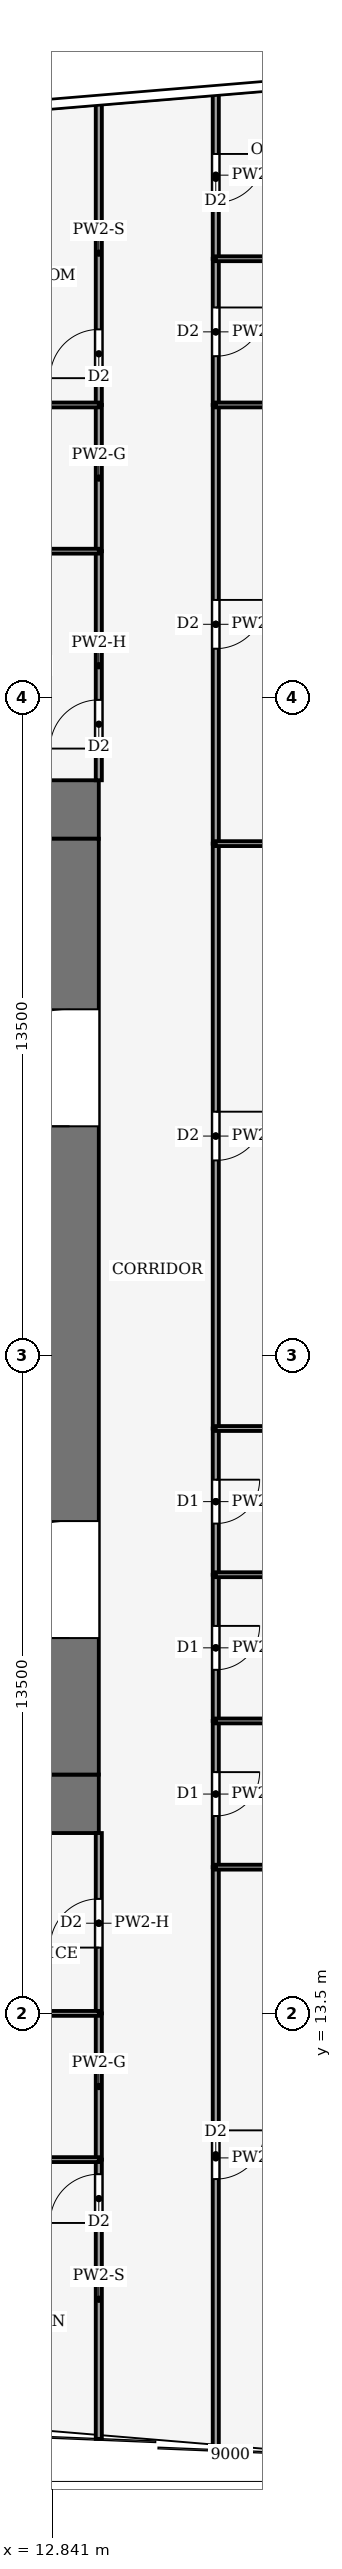
"""IFC4 building model, lengths in metres.
Left out: names, types, materials, properties, quantities, classifications, styles, units other than length and angle.
Written with IfcOpenShell. Run it as: python <this file> out.ifc"""

import sys

from ifc_helpers import new_model, si_unit, direction, frame, frame_2d, origin, place, context, subcontext, project, spatial, rectangle, extrude, element, fill, save


model = new_model("IFC4")
c1 = context("Model", 3, precision=1e-05, world=origin(), true_north=direction((0.0, 1.0)))
c2 = subcontext(c1, "Body", "Model", "MODEL_VIEW")
j1 = project(units=[si_unit("LENGTHUNIT", "METRE"), si_unit("PLANEANGLEUNIT", "RADIAN")], contexts=[c1])
p1 = place(None, origin())
s1 = spatial("IfcSite", under=j1, at=p1, CompositionType="ELEMENT")
p2 = place(p1, origin())
s2 = spatial("IfcBuilding", under=s1, at=p2, CompositionType="ELEMENT")
p3 = place(p2, frame((0.0, 0.0, 74.0)))
s3 = spatial("IfcBuildingStorey", under=s2, at=p3, CompositionType="ELEMENT", Elevation=74.0)
for number, where, z_axis, x_axis in (
    (1, (-13.8, 17.8, -0.13), (0.0, 0.0, 1.0), (1.0, 0.0, 0.0)),
    (2, (-13.8, 38.2, -0.13), (0.0, 0.0, 1.0), (1.0, 0.0, 0.0)),
):
    element("IfcWall", number, at=place(p3, frame(where, z_axis=z_axis, x_axis=x_axis)), inside=s3, PredefinedType="SHEAR", context=c2, shape_type="SweptSolid", body=[
        extrude(rectangle(XDim=27.6, YDim=1.2, at=frame_2d((13.8, 0.0))), origin(), (0.0, 0.0, 1.0), 4.0),
    ])
p4 = place(p3, frame((13.2, 18.4, -0.13), z_axis=(0.0, 0.0, 1.0), x_axis=(0.0, 1.0, 0.0)))
e3 = element("IfcWall", 3, at=p4, inside=s3, PredefinedType="SHEAR", context=c2, shape_type="SweptSolid", body=[
    extrude(rectangle(XDim=19.2, YDim=1.2, at=frame_2d((9.6, 0.0))), origin(), (0.0, 0.0, 1.0), 4.0),
])
p5 = place(p4, frame((2.8, 0.0, 0.13)))
e4 = element("IfcOpeningElement", 4, at=p5, cuts=e3, PredefinedType="OPENING", context=c2, shape_type="SweptSolid", body=[
    extrude(rectangle(XDim=2.4, YDim=2.4, at=frame_2d((1.2, 1.2))), frame((0.0, 0.61, 0.0), z_axis=(0.0, -1.0, 0.0), x_axis=(1.0, 0.0, 0.0)), (0.0, 0.0, 1.0), 1.22),
])
p6 = place(p4, frame((13.3, 0.0, 0.13)))
e5 = element("IfcOpeningElement", 5, at=p6, cuts=e3, PredefinedType="OPENING", context=c2, shape_type="SweptSolid", body=[
    extrude(rectangle(XDim=2.4, YDim=2.4, at=frame_2d((1.2, 1.2))), frame((0.0, 0.61, 0.0), z_axis=(0.0, -1.0, 0.0), x_axis=(1.0, 0.0, 0.0)), (0.0, 0.0, 1.0), 1.22),
])
p7 = place(p3, frame((16.2, 16.5, 0.0), z_axis=(0.0, 0.0, 1.0), x_axis=(0.0, -1.0, 0.0)))
e6 = element("IfcWall", 6, at=p7, inside=s3, PredefinedType="PARTITIONING", context=c2, shape_type="SweptSolid", body=[
    extrude(rectangle(XDim=11.93, YDim=0.125, at=frame_2d((5.965, 0.0))), origin(), (0.0, 0.0, 1.0), 3.04),
])
p8 = place(p7, frame((5.4, 0.0, 0.0)))
e7 = element("IfcOpeningElement", 7, at=p8, cuts=e6, PredefinedType="OPENING", context=c2, shape_type="SweptSolid", body=[
    extrude(rectangle(XDim=1.0, YDim=2.1, at=frame_2d((0.5, 1.05))), frame((0.0, 0.073, 0.0), z_axis=(0.0, -1.0, 0.0), x_axis=(1.0, 0.0, 0.0)), (0.0, 0.0, 1.0), 0.145),
])
p9 = place(p3, frame((16.2, 19.5, 0.0), z_axis=(0.0, 0.0, 1.0), x_axis=(0.0, -1.0, 0.0)))
e8 = element("IfcWall", 8, at=p9, inside=s3, PredefinedType="PARTITIONING", context=c2, shape_type="SweptSolid", body=[
    extrude(rectangle(XDim=3.0, YDim=0.125, at=frame_2d((1.5, 0.0))), origin(), (0.0, 0.0, 1.0), 3.14),
])
p10 = place(p9, frame((1.05, 0.0, 0.0)))
e9 = element("IfcOpeningElement", 9, at=p10, cuts=e8, PredefinedType="OPENING", context=c2, shape_type="SweptSolid", body=[
    extrude(rectangle(XDim=0.9, YDim=2.1, at=frame_2d((0.45, 1.05))), frame((0.0, 0.073, 0.0), z_axis=(0.0, -1.0, 0.0), x_axis=(1.0, 0.0, 0.0)), (0.0, 0.0, 1.0), 0.145),
])
p11 = place(p3, frame((16.2, 22.5, 0.0), z_axis=(0.0, 0.0, 1.0), x_axis=(0.0, -1.0, 0.0)))
e10 = element("IfcWall", 10, at=p11, inside=s3, PredefinedType="PARTITIONING", context=c2, shape_type="SweptSolid", body=[
    extrude(rectangle(XDim=3.0, YDim=0.125, at=frame_2d((1.5, 0.0))), origin(), (0.0, 0.0, 1.0), 3.87),
])
p12 = place(p11, frame((1.05, 0.0, 0.0)))
e11 = element("IfcOpeningElement", 11, at=p12, cuts=e10, PredefinedType="OPENING", context=c2, shape_type="SweptSolid", body=[
    extrude(rectangle(XDim=0.9, YDim=2.1, at=frame_2d((0.45, 1.05))), frame((0.0, 0.073, 0.0), z_axis=(0.0, -1.0, 0.0), x_axis=(1.0, 0.0, 0.0)), (0.0, 0.0, 1.0), 0.145),
])
p13 = place(p3, frame((16.2, 25.5, 0.0), z_axis=(0.0, 0.0, 1.0), x_axis=(0.0, -1.0, 0.0)))
e12 = element("IfcWall", 12, at=p13, inside=s3, PredefinedType="PARTITIONING", context=c2, shape_type="SweptSolid", body=[
    extrude(rectangle(XDim=3.0, YDim=0.125, at=frame_2d((1.5, 0.0))), origin(), (0.0, 0.0, 1.0), 3.48),
])
p14 = place(p13, frame((1.05, 0.0, 0.0)))
e13 = element("IfcOpeningElement", 13, at=p14, cuts=e12, PredefinedType="OPENING", context=c2, shape_type="SweptSolid", body=[
    extrude(rectangle(XDim=0.9, YDim=2.1, at=frame_2d((0.45, 1.05))), frame((0.0, 0.073, 0.0), z_axis=(0.0, -1.0, 0.0), x_axis=(1.0, 0.0, 0.0)), (0.0, 0.0, 1.0), 0.145),
])
p15 = place(p3, frame((16.2, 37.5, 0.0), z_axis=(0.0, 0.0, 1.0), x_axis=(0.0, -1.0, 0.0)))
e14 = element("IfcWall", 14, at=p15, inside=s3, PredefinedType="PARTITIONING", context=c2, shape_type="SweptSolid", body=[
    extrude(rectangle(XDim=12.0, YDim=0.125, at=frame_2d((6.0, 0.0))), origin(), (0.0, 0.0, 1.0), 3.48),
])
p16 = place(p15, frame((5.5, 0.0, 0.0)))
e15 = element("IfcOpeningElement", 15, at=p16, cuts=e14, PredefinedType="OPENING", context=c2, shape_type="SweptSolid", body=[
    extrude(rectangle(XDim=1.0, YDim=2.1, at=frame_2d((0.5, 1.05))), frame((0.0, 0.073, 0.0), z_axis=(0.0, -1.0, 0.0), x_axis=(1.0, 0.0, 0.0)), (0.0, 0.0, 1.0), 0.145),
])
p17 = place(p3, frame((16.2, 46.5, 0.0), z_axis=(0.0, 0.0, 1.0), x_axis=(0.0, -1.0, 0.0)))
e16 = element("IfcWall", 16, at=p17, inside=s3, PredefinedType="PARTITIONING", context=c2, shape_type="SweptSolid", body=[
    extrude(rectangle(XDim=9.0, YDim=0.125, at=frame_2d((4.5, 0.0))), origin(), (0.0, 0.0, 1.0), 3.14),
])
p18 = place(p17, frame((4.0, 0.0, 0.0)))
e17 = element("IfcOpeningElement", 17, at=p18, cuts=e16, PredefinedType="OPENING", context=c2, shape_type="SweptSolid", body=[
    extrude(rectangle(XDim=1.0, YDim=2.1, at=frame_2d((0.5, 1.05))), frame((0.0, 0.073, 0.0), z_axis=(0.0, -1.0, 0.0), x_axis=(1.0, 0.0, 0.0)), (0.0, 0.0, 1.0), 0.145),
])
p19 = place(p3, frame((16.2, 49.5, 0.0), z_axis=(0.0, 0.0, 1.0), x_axis=(0.0, -1.0, 0.0)))
e18 = element("IfcWall", 18, at=p19, inside=s3, PredefinedType="PARTITIONING", context=c2, shape_type="SweptSolid", body=[
    extrude(rectangle(XDim=3.0, YDim=0.125, at=frame_2d((1.5, 0.0))), origin(), (0.0, 0.0, 1.0), 3.87),
])
p20 = place(p19, frame((1.0, 0.0, 0.0)))
e19 = element("IfcOpeningElement", 19, at=p20, cuts=e18, PredefinedType="OPENING", context=c2, shape_type="SweptSolid", body=[
    extrude(rectangle(XDim=1.0, YDim=2.1, at=frame_2d((0.5, 1.05))), frame((0.0, 0.073, 0.0), z_axis=(0.0, -1.0, 0.0), x_axis=(1.0, 0.0, 0.0)), (0.0, 0.0, 1.0), 0.145),
])
p21 = place(p3, frame((16.2, 52.93, 0.0), z_axis=(0.0, 0.0, 1.0), x_axis=(0.0, -1.0, 0.0)))
e20 = element("IfcWall", 20, at=p21, inside=s3, PredefinedType="PARTITIONING", context=c2, shape_type="SweptSolid", body=[
    extrude(rectangle(XDim=3.43, YDim=0.125, at=frame_2d((1.715, 0.0))), origin(), (0.0, 0.0, 1.0), 3.04),
])
p22 = place(p21, frame((1.28, 0.0, 0.0)))
e21 = element("IfcOpeningElement", 21, at=p22, cuts=e20, PredefinedType="OPENING", context=c2, shape_type="SweptSolid", body=[
    extrude(rectangle(XDim=1.0, YDim=2.1, at=frame_2d((0.5, 1.05))), frame((0.0, 0.073, 0.0), z_axis=(0.0, -1.0, 0.0), x_axis=(1.0, 0.0, 0.0)), (0.0, 0.0, 1.0), 0.145),
])
p23 = place(p3, frame((13.8, 4.77, 0.0), z_axis=(0.0, 0.0, 1.0), x_axis=(0.0, 1.0, 0.0)))
e22 = element("IfcWall", 22, at=p23, inside=s3, PredefinedType="PARTITIONING", context=c2, shape_type="SweptSolid", body=[
    extrude(rectangle(XDim=5.73, YDim=0.125, at=frame_2d((2.865, 0.0))), origin(), (0.0, 0.0, 1.0), 3.04),
])
p24 = place(p23, frame((4.43, 0.0, 0.0)))
e23 = element("IfcOpeningElement", 23, at=p24, cuts=e22, PredefinedType="OPENING", context=c2, shape_type="SweptSolid", body=[
    extrude(rectangle(XDim=1.0, YDim=2.1, at=frame_2d((0.5, 1.05))), frame((0.0, 0.073, 0.0), z_axis=(0.0, -1.0, 0.0), x_axis=(1.0, 0.0, 0.0)), (0.0, 0.0, 1.0), 0.145),
])
p25 = place(p3, frame((13.8, 13.5, 0.0), z_axis=(0.0, 0.0, 1.0), x_axis=(0.0, -1.0, 0.0)))
e24 = element("IfcWall", 24, at=p25, inside=s3, PredefinedType="PARTITIONING", context=c2, shape_type="SweptSolid", body=[
    extrude(rectangle(XDim=3.0, YDim=0.125, at=frame_2d((1.5, 0.0))), origin(), (0.0, 0.0, 1.0), 3.87),
])
p26 = place(p3, frame((13.8, 13.5, 0.0), z_axis=(0.0, 0.0, 1.0), x_axis=(0.0, 1.0, 0.0)))
e25 = element("IfcWall", 25, at=p26, inside=s3, PredefinedType="PARTITIONING", context=c2, shape_type="SweptSolid", body=[
    extrude(rectangle(XDim=3.7, YDim=0.125, at=frame_2d((1.85, 0.0))), origin(), (0.0, 0.0, 1.0), 3.14),
])
p27 = place(p26, frame((1.35, 0.0, 0.0)))
e26 = element("IfcOpeningElement", 26, at=p27, cuts=e25, PredefinedType="OPENING", context=c2, shape_type="SweptSolid", body=[
    extrude(rectangle(XDim=1.0, YDim=2.1, at=frame_2d((0.5, 1.05))), frame((0.0, 0.073, 0.0), z_axis=(0.0, -1.0, 0.0), x_axis=(1.0, 0.0, 0.0)), (0.0, 0.0, 1.0), 0.145),
])
p28 = place(p3, frame((13.8, 38.8, 0.0), z_axis=(0.0, 0.0, 1.0), x_axis=(0.0, 1.0, 0.0)))
e27 = element("IfcWall", 27, at=p28, inside=s3, PredefinedType="PARTITIONING", context=c2, shape_type="SweptSolid", body=[
    extrude(rectangle(XDim=4.7, YDim=0.125, at=frame_2d((2.35, 0.0))), origin(), (0.0, 0.0, 1.0), 3.14),
])
p29 = place(p28, frame((0.65, 0.0, 0.0)))
e28 = element("IfcOpeningElement", 28, at=p29, cuts=e27, PredefinedType="OPENING", context=c2, shape_type="SweptSolid", body=[
    extrude(rectangle(XDim=1.0, YDim=2.1, at=frame_2d((0.5, 1.05))), frame((0.0, 0.073, 0.0), z_axis=(0.0, -1.0, 0.0), x_axis=(1.0, 0.0, 0.0)), (0.0, 0.0, 1.0), 0.145),
])
p30 = place(p3, frame((13.8, 46.5, 0.0), z_axis=(0.0, 0.0, 1.0), x_axis=(0.0, -1.0, 0.0)))
e29 = element("IfcWall", 29, at=p30, inside=s3, PredefinedType="PARTITIONING", context=c2, shape_type="SweptSolid", body=[
    extrude(rectangle(XDim=3.0, YDim=0.125, at=frame_2d((1.5, 0.0))), origin(), (0.0, 0.0, 1.0), 3.87),
])
p31 = place(p3, frame((13.8, 46.5, 0.0), z_axis=(0.0, 0.0, 1.0), x_axis=(0.0, 1.0, 0.0)))
e30 = element("IfcWall", 30, at=p31, inside=s3, PredefinedType="PARTITIONING", context=c2, shape_type="SweptSolid", body=[
    extrude(rectangle(XDim=6.23, YDim=0.125, at=frame_2d((3.115, 0.0))), origin(), (0.0, 0.0, 1.0), 3.04),
])
p32 = place(p31, frame((0.55, 0.0, 0.0)))
e31 = element("IfcOpeningElement", 31, at=p32, cuts=e30, PredefinedType="OPENING", context=c2, shape_type="SweptSolid", body=[
    extrude(rectangle(XDim=1.0, YDim=2.1, at=frame_2d((0.5, 1.05))), frame((0.0, 0.073, 0.0), z_axis=(0.0, -1.0, 0.0), x_axis=(1.0, 0.0, 0.0)), (0.0, 0.0, 1.0), 0.145),
])
p33 = place(p3, frame((23.587, 16.5, 0.0), z_axis=(0.0, 0.0, 1.0), x_axis=(-1.0, 0.0, 0.0)))
e32 = element("IfcWall", 32, at=p33, inside=s3, PredefinedType="PARTITIONING", context=c2, shape_type="SweptSolid", body=[
    extrude(rectangle(XDim=7.387, YDim=0.1, at=frame_2d((3.693, 0.0))), origin(), (0.0, 0.0, 1.0), 3.04),
])
p34 = place(p3, frame((23.34, 19.5, 0.0), z_axis=(0.0, 0.0, 1.0), x_axis=(-1.0, 0.0, 0.0)))
e33 = element("IfcWall", 33, at=p34, inside=s3, PredefinedType="PARTITIONING", context=c2, shape_type="SweptSolid", body=[
    extrude(rectangle(XDim=7.14, YDim=0.1, at=frame_2d((3.57, 0.0))), origin(), (0.0, 0.0, 1.0), 3.04),
])
p35 = place(p3, frame((23.094, 22.5, 0.0), z_axis=(0.0, 0.0, 1.0), x_axis=(-1.0, 0.0, 0.0)))
e34 = element("IfcWall", 34, at=p35, inside=s3, PredefinedType="PARTITIONING", context=c2, shape_type="SweptSolid", body=[
    extrude(rectangle(XDim=6.894, YDim=0.1, at=frame_2d((3.447, 0.0))), origin(), (0.0, 0.0, 1.0), 3.04),
])
p36 = place(p3, frame((22.847, 25.5, 0.0), z_axis=(0.0, 0.0, 1.0), x_axis=(-1.0, 0.0, 0.0)))
e35 = element("IfcWall", 35, at=p36, inside=s3, PredefinedType="PARTITIONING", context=c2, shape_type="SweptSolid", body=[
    extrude(rectangle(XDim=6.647, YDim=0.1, at=frame_2d((3.324, 0.0))), origin(), (0.0, 0.0, 1.0), 3.04),
])
p37 = place(p3, frame((23.299, 37.5, 0.0), z_axis=(0.0, 0.0, 1.0), x_axis=(-1.0, 0.0, 0.0)))
e36 = element("IfcWall", 36, at=p37, inside=s3, PredefinedType="PARTITIONING", context=c2, shape_type="SweptSolid", body=[
    extrude(rectangle(XDim=7.099, YDim=0.1, at=frame_2d((3.55, 0.0))), origin(), (0.0, 0.0, 1.0), 3.04),
])
p38 = place(p3, frame((24.039, 46.5, 0.0), z_axis=(0.0, 0.0, 1.0), x_axis=(-1.0, 0.0, 0.0)))
e37 = element("IfcWall", 37, at=p38, inside=s3, PredefinedType="PARTITIONING", context=c2, shape_type="SweptSolid", body=[
    extrude(rectangle(XDim=7.839, YDim=0.1, at=frame_2d((3.919, 0.0))), origin(), (0.0, 0.0, 1.0), 3.04),
])
p39 = place(p3, frame((23.487, 49.5, 0.0), z_axis=(0.0, 0.0, 1.0), x_axis=(-1.0, 0.0, 0.0)))
e38 = element("IfcWall", 38, at=p39, inside=s3, PredefinedType="PARTITIONING", context=c2, shape_type="SweptSolid", body=[
    extrude(rectangle(XDim=7.287, YDim=0.1, at=frame_2d((3.644, 0.0))), origin(), (0.0, 0.0, 1.0), 3.34),
])
p40 = place(p3, frame((7.5, 10.5, 0.0), z_axis=(0.0, 0.0, 1.0), x_axis=(1.0, 0.0, 0.0)))
e39 = element("IfcWall", 39, at=p40, inside=s3, PredefinedType="PARTITIONING", context=c2, shape_type="SweptSolid", body=[
    extrude(rectangle(XDim=6.3, YDim=0.1, at=frame_2d((3.15, 0.0))), origin(), (0.0, 0.0, 1.0), 3.39),
])
p41 = place(p40, frame((2.65, 0.0, 0.0)))
e40 = element("IfcOpeningElement", 40, at=p41, cuts=e39, PredefinedType="OPENING", context=c2, shape_type="SweptSolid", body=[
    extrude(rectangle(XDim=1.0, YDim=2.1, at=frame_2d((0.5, 1.05))), frame((0.0, 0.06, 0.0), z_axis=(0.0, -1.0, 0.0), x_axis=(1.0, 0.0, 0.0)), (0.0, 0.0, 1.0), 0.12),
])
p42 = place(p3, frame((13.8, 13.5, 0.0), z_axis=(0.0, 0.0, 1.0), x_axis=(-1.0, 0.0, 0.0)))
e41 = element("IfcWall", 41, at=p42, inside=s3, PredefinedType="PARTITIONING", context=c2, shape_type="SweptSolid", body=[
    extrude(rectangle(XDim=6.3, YDim=0.1, at=frame_2d((3.15, 0.0))), origin(), (0.0, 0.0, 1.0), 3.39),
])
p43 = place(p3, frame((7.5, 43.5, 0.0), z_axis=(0.0, 0.0, 1.0), x_axis=(1.0, 0.0, 0.0)))
e42 = element("IfcWall", 42, at=p43, inside=s3, PredefinedType="PARTITIONING", context=c2, shape_type="SweptSolid", body=[
    extrude(rectangle(XDim=6.3, YDim=0.1, at=frame_2d((3.15, 0.0))), origin(), (0.0, 0.0, 1.0), 3.39),
])
p44 = place(p43, frame((2.65, 0.0, 0.0)))
e43 = element("IfcOpeningElement", 43, at=p44, cuts=e42, PredefinedType="OPENING", context=c2, shape_type="SweptSolid", body=[
    extrude(rectangle(XDim=1.0, YDim=2.1, at=frame_2d((0.5, 1.05))), frame((0.0, 0.06, 0.0), z_axis=(0.0, -1.0, 0.0), x_axis=(1.0, 0.0, 0.0)), (0.0, 0.0, 1.0), 0.12),
])
p45 = place(p3, frame((13.8, 46.5, 0.0), z_axis=(0.0, 0.0, 1.0), x_axis=(-1.0, 0.0, 0.0)))
e44 = element("IfcWall", 44, at=p45, inside=s3, PredefinedType="PARTITIONING", context=c2, shape_type="SweptSolid", body=[
    extrude(rectangle(XDim=6.3, YDim=0.1, at=frame_2d((3.15, 0.0))), origin(), (0.0, 0.0, 1.0), 3.39),
])
p46 = place(p5, origin())
e45 = element("IfcDoor", 45, at=p46, inside=s3, OperationType="DOUBLE_DOOR_SINGLE_SWING", PredefinedType="DOOR", context=c2, shape_type="SweptSolid", body=[
    extrude(rectangle(XDim=2.4, YDim=2.4, at=frame_2d((1.2, 1.2))), frame((0.0, 0.025, 0.0), z_axis=(0.0, -1.0, 0.0), x_axis=(1.0, 0.0, 0.0)), (0.0, 0.0, 1.0), 0.05),
])
fill(e4, e45)
p47 = place(p6, origin())
e46 = element("IfcDoor", 46, at=p47, inside=s3, OperationType="DOUBLE_DOOR_SINGLE_SWING", PredefinedType="DOOR", context=c2, shape_type="SweptSolid", body=[
    extrude(rectangle(XDim=2.4, YDim=2.4, at=frame_2d((1.2, 1.2))), frame((0.0, 0.025, 0.0), z_axis=(0.0, -1.0, 0.0), x_axis=(1.0, 0.0, 0.0)), (0.0, 0.0, 1.0), 0.05),
])
fill(e5, e46)
p48 = place(p8, origin())
e47 = element("IfcDoor", 47, at=p48, inside=s3, OperationType="SINGLE_SWING_LEFT", PredefinedType="DOOR", context=c2, shape_type="SweptSolid", body=[
    extrude(rectangle(XDim=1.0, YDim=2.1, at=frame_2d((0.5, 1.05))), frame((0.0, 0.025, 0.0), z_axis=(0.0, -1.0, 0.0), x_axis=(1.0, 0.0, 0.0)), (0.0, 0.0, 1.0), 0.05),
])
fill(e7, e47)
p49 = place(p10, origin())
e48 = element("IfcDoor", 48, at=p49, inside=s3, OperationType="SINGLE_SWING_RIGHT", PredefinedType="DOOR", context=c2, shape_type="SweptSolid", body=[
    extrude(rectangle(XDim=0.9, YDim=2.1, at=frame_2d((0.45, 1.05))), frame((0.0, 0.025, 0.0), z_axis=(0.0, -1.0, 0.0), x_axis=(1.0, 0.0, 0.0)), (0.0, 0.0, 1.0), 0.05),
])
fill(e9, e48)
p50 = place(p12, origin())
e49 = element("IfcDoor", 49, at=p50, inside=s3, OperationType="SINGLE_SWING_LEFT", PredefinedType="DOOR", context=c2, shape_type="SweptSolid", body=[
    extrude(rectangle(XDim=0.9, YDim=2.1, at=frame_2d((0.45, 1.05))), frame((0.0, 0.025, 0.0), z_axis=(0.0, -1.0, 0.0), x_axis=(1.0, 0.0, 0.0)), (0.0, 0.0, 1.0), 0.05),
])
fill(e11, e49)
p51 = place(p14, origin())
e50 = element("IfcDoor", 50, at=p51, inside=s3, OperationType="SINGLE_SWING_RIGHT", PredefinedType="DOOR", context=c2, shape_type="SweptSolid", body=[
    extrude(rectangle(XDim=0.9, YDim=2.1, at=frame_2d((0.45, 1.05))), frame((0.0, 0.025, 0.0), z_axis=(0.0, -1.0, 0.0), x_axis=(1.0, 0.0, 0.0)), (0.0, 0.0, 1.0), 0.05),
])
fill(e13, e50)
p52 = place(p16, origin())
e51 = element("IfcDoor", 51, at=p52, inside=s3, OperationType="SINGLE_SWING_LEFT", PredefinedType="DOOR", context=c2, shape_type="SweptSolid", body=[
    extrude(rectangle(XDim=1.0, YDim=2.1, at=frame_2d((0.5, 1.05))), frame((0.0, 0.025, 0.0), z_axis=(0.0, -1.0, 0.0), x_axis=(1.0, 0.0, 0.0)), (0.0, 0.0, 1.0), 0.05),
])
fill(e15, e51)
p53 = place(p18, origin())
e52 = element("IfcDoor", 52, at=p53, inside=s3, OperationType="SINGLE_SWING_RIGHT", PredefinedType="DOOR", context=c2, shape_type="SweptSolid", body=[
    extrude(rectangle(XDim=1.0, YDim=2.1, at=frame_2d((0.5, 1.05))), frame((0.0, 0.025, 0.0), z_axis=(0.0, -1.0, 0.0), x_axis=(1.0, 0.0, 0.0)), (0.0, 0.0, 1.0), 0.05),
])
fill(e17, e52)
p54 = place(p20, origin())
e53 = element("IfcDoor", 53, at=p54, inside=s3, OperationType="SINGLE_SWING_LEFT", PredefinedType="DOOR", context=c2, shape_type="SweptSolid", body=[
    extrude(rectangle(XDim=1.0, YDim=2.1, at=frame_2d((0.5, 1.05))), frame((0.0, 0.025, 0.0), z_axis=(0.0, -1.0, 0.0), x_axis=(1.0, 0.0, 0.0)), (0.0, 0.0, 1.0), 0.05),
])
fill(e19, e53)
p55 = place(p22, origin())
e54 = element("IfcDoor", 54, at=p55, inside=s3, OperationType="SINGLE_SWING_RIGHT", PredefinedType="DOOR", context=c2, shape_type="SweptSolid", body=[
    extrude(rectangle(XDim=1.0, YDim=2.1, at=frame_2d((0.5, 1.05))), frame((0.0, 0.025, 0.0), z_axis=(0.0, -1.0, 0.0), x_axis=(1.0, 0.0, 0.0)), (0.0, 0.0, 1.0), 0.05),
])
fill(e21, e54)
p56 = place(p24, origin())
e55 = element("IfcDoor", 55, at=p56, inside=s3, OperationType="SINGLE_SWING_RIGHT", PredefinedType="DOOR", context=c2, shape_type="SweptSolid", body=[
    extrude(rectangle(XDim=1.0, YDim=2.1, at=frame_2d((0.5, 1.05))), frame((0.0, 0.025, 0.0), z_axis=(0.0, -1.0, 0.0), x_axis=(1.0, 0.0, 0.0)), (0.0, 0.0, 1.0), 0.05),
])
fill(e23, e55)
p57 = place(p27, origin())
e56 = element("IfcDoor", 56, at=p57, inside=s3, OperationType="SINGLE_SWING_RIGHT", PredefinedType="DOOR", context=c2, shape_type="SweptSolid", body=[
    extrude(rectangle(XDim=1.0, YDim=2.1, at=frame_2d((0.5, 1.05))), frame((0.0, 0.025, 0.0), z_axis=(0.0, -1.0, 0.0), x_axis=(1.0, 0.0, 0.0)), (0.0, 0.0, 1.0), 0.05),
])
fill(e26, e56)
p58 = place(p29, origin())
e57 = element("IfcDoor", 57, at=p58, inside=s3, OperationType="SINGLE_SWING_LEFT", PredefinedType="DOOR", context=c2, shape_type="SweptSolid", body=[
    extrude(rectangle(XDim=1.0, YDim=2.1, at=frame_2d((0.5, 1.05))), frame((0.0, 0.025, 0.0), z_axis=(0.0, -1.0, 0.0), x_axis=(1.0, 0.0, 0.0)), (0.0, 0.0, 1.0), 0.05),
])
fill(e28, e57)
p59 = place(p32, origin())
e58 = element("IfcDoor", 58, at=p59, inside=s3, OperationType="SINGLE_SWING_LEFT", PredefinedType="DOOR", context=c2, shape_type="SweptSolid", body=[
    extrude(rectangle(XDim=1.0, YDim=2.1, at=frame_2d((0.5, 1.05))), frame((0.0, 0.025, 0.0), z_axis=(0.0, -1.0, 0.0), x_axis=(1.0, 0.0, 0.0)), (0.0, 0.0, 1.0), 0.05),
])
fill(e31, e58)
save(model, sys.argv[1])
